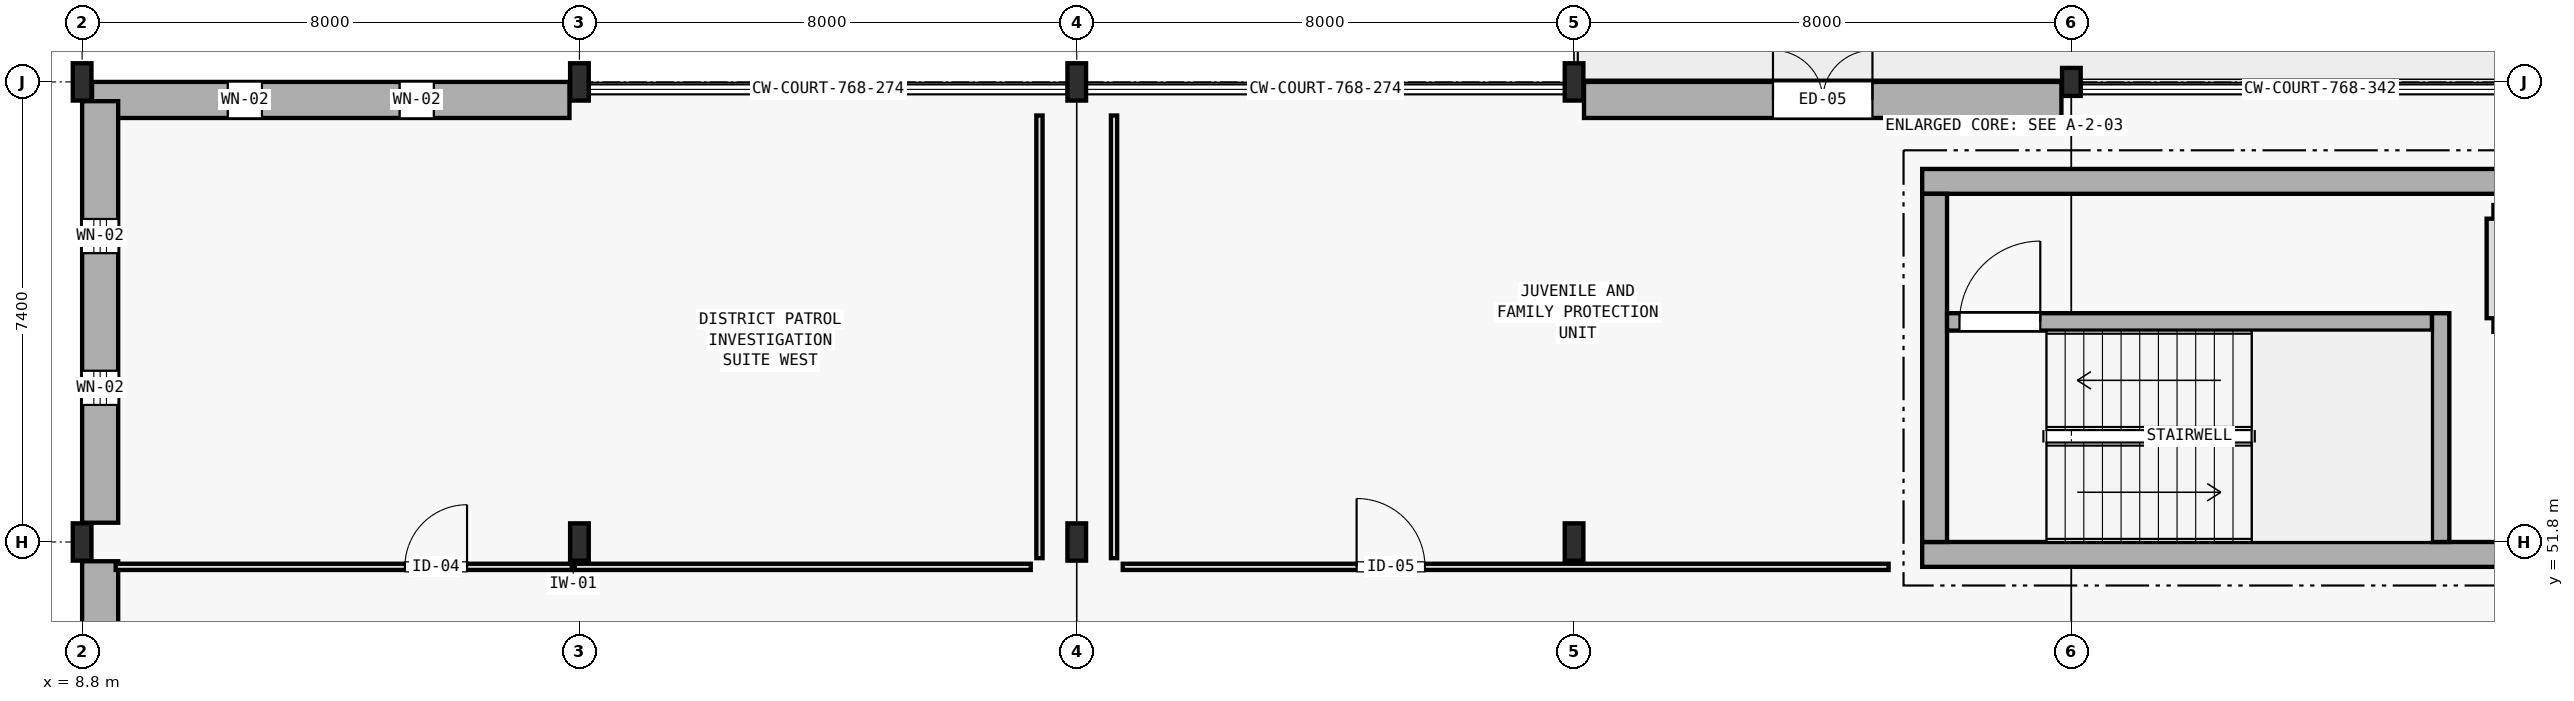
"""IFC4 building model, lengths in metres.
Left out: names, types, materials, properties, quantities, classifications, styles, units other than length and angle.
Written with IfcOpenShell. Run it as: python <this file> out.ifc"""

import sys

from ifc_helpers import new_model, si_unit, direction, frame, frame_2d, origin, origin_2d, place, context, subcontext, project, spatial, rectangle, i_section, extrude, element, fill, save


model = new_model("IFC4")
c1 = context("Model", 3, precision=1e-05, world=origin(), true_north=direction((0.0, 1.0)))
c2 = subcontext(c1, "Body", "Model", "MODEL_VIEW")
j1 = project(units=[si_unit("LENGTHUNIT", "METRE"), si_unit("PLANEANGLEUNIT", "RADIAN")], contexts=[c1])
p1 = place(None, origin())
s1 = spatial("IfcSite", under=j1, at=p1, CompositionType="ELEMENT")
p2 = place(p1, origin())
s2 = spatial("IfcBuilding", under=s1, at=p2, CompositionType="ELEMENT")
p3 = place(p2, frame((0.0, 0.0, 9.9)))
s3 = spatial("IfcBuildingStorey", under=s2, at=p3, CompositionType="ELEMENT", Elevation=9.9)
p4 = place(p3, frame((38.4, 51.6, 0.0), z_axis=(0.0, 0.0, 1.0), x_axis=(1.0, 0.0, 0.0)))
e1 = element("IfcWall", 1, at=p4, inside=s3, PredefinedType="SHEAR", context=c2, shape_type="SweptSolid", body=[
    extrude(rectangle(XDim=15.2, YDim=0.4, at=frame_2d((7.6, 0.0))), origin(), (0.0, 0.0, 1.0), 4.195),
])
p5 = place(p4, frame((10.25, 0.0, 0.0)))
e2 = element("IfcOpeningElement", 2, at=p5, cuts=e1, PredefinedType="OPENING", context=c2, shape_type="SweptSolid", body=[
    extrude(rectangle(XDim=1.3, YDim=2.2, at=frame_2d((0.65, 1.1))), frame((0.0, 0.21, 0.0), z_axis=(0.0, -1.0, 0.0), x_axis=(1.0, 0.0, 0.0)), (0.0, 0.0, 1.0), 0.42),
])
p6 = place(p3, frame((38.4, 57.6, 0.0), z_axis=(0.0, 0.0, 1.0), x_axis=(1.0, 0.0, 0.0)))
e3 = element("IfcWall", 3, at=p6, inside=s3, PredefinedType="SHEAR", context=c2, shape_type="SweptSolid", body=[
    extrude(rectangle(XDim=15.2, YDim=0.4, at=frame_2d((7.6, 0.0))), origin(), (0.0, 0.0, 1.0), 4.195),
])
p7 = place(p3, frame((38.6, 51.8, 0.0), z_axis=(0.0, 0.0, 1.0), x_axis=(0.0, 1.0, 0.0)))
e4 = element("IfcWall", 4, at=p7, inside=s3, PredefinedType="SHEAR", context=c2, shape_type="SweptSolid", body=[
    extrude(rectangle(XDim=5.6, YDim=0.4, at=frame_2d((2.8, 0.0))), origin(), (0.0, 0.0, 1.0), 4.195),
])
p8 = place(p3, frame((46.74, 51.8, 0.0), z_axis=(0.0, 0.0, 1.0), x_axis=(0.0, 1.0, 0.0)))
e5 = element("IfcWall", 5, at=p8, inside=s3, PredefinedType="SHEAR", context=c2, shape_type="SweptSolid", body=[
    extrude(rectangle(XDim=3.68, YDim=0.28, at=frame_2d((1.84, 0.0))), origin(), (0.0, 0.0, 1.0), 4.195),
])
p9 = place(p3, frame((38.8, 55.34, 0.0), z_axis=(0.0, 0.0, 1.0), x_axis=(1.0, 0.0, 0.0)))
e6 = element("IfcWall", 6, at=p9, inside=s3, PredefinedType="SHEAR", context=c2, shape_type="SweptSolid", body=[
    extrude(rectangle(XDim=7.8, YDim=0.28, at=frame_2d((3.9, 0.0))), origin(), (0.0, 0.0, 1.0), 4.195),
])
p10 = place(p9, frame((0.2, 0.0, 0.0)))
e7 = element("IfcOpeningElement", 7, at=p10, cuts=e6, PredefinedType="OPENING", context=c2, shape_type="SweptSolid", body=[
    extrude(rectangle(XDim=1.3, YDim=2.2, at=frame_2d((0.65, 1.1))), frame((0.0, 0.15, 0.0), z_axis=(0.0, -1.0, 0.0), x_axis=(1.0, 0.0, 0.0)), (0.0, 0.0, 1.0), 0.3),
])
for number, where, z_axis, x_axis in (
    (8, (8.8, 51.8, 0.0), (0.0, 0.0, 1.0), (1.0, 0.0, 0.0)),
    (9, (8.8, 59.2, 0.0), (0.0, 0.0, 1.0), (1.0, 0.0, 0.0)),
    (10, (16.8, 51.8, 0.0), (0.0, 0.0, 1.0), (1.0, 0.0, 0.0)),
    (11, (16.8, 59.2, 0.0), (0.0, 0.0, 1.0), (1.0, 0.0, 0.0)),
    (12, (24.8, 51.8, 0.0), (0.0, 0.0, 1.0), (1.0, 0.0, 0.0)),
    (13, (24.8, 59.2, 0.0), (0.0, 0.0, 1.0), (1.0, 0.0, 0.0)),
    (14, (32.8, 51.8, 0.0), (0.0, 0.0, 1.0), (1.0, 0.0, 0.0)),
    (15, (32.8, 59.2, 0.0), (0.0, 0.0, 1.0), (1.0, 0.0, 0.0)),
):
    element("IfcColumn", number, at=place(p3, frame(where, z_axis=z_axis, x_axis=x_axis)), inside=s3, PredefinedType="COLUMN", context=c2, shape_type="SweptSolid", body=[
        extrude(i_section(OverallWidth=0.3, OverallDepth=0.6, WebThickness=0.015, FlangeThickness=0.03, FilletRadius=0.027, at=origin_2d()), origin(), (0.0, 0.0, 1.0), 4.2),
    ])
p11 = place(p3, frame((40.8, 59.2, 0.0), z_axis=(0.0, 0.0, 1.0), x_axis=(1.0, 0.0, 0.0)))
e16 = element("IfcColumn", 16, at=p11, inside=s3, PredefinedType="COLUMN", context=c2, shape_type="SweptSolid", body=[
    extrude(i_section(OverallWidth=0.3, OverallDepth=0.45, WebThickness=0.014, FlangeThickness=0.026, FilletRadius=0.027, at=origin_2d()), origin(), (0.0, 0.0, 1.0), 4.2),
])
p12 = place(p3, frame((8.96, 58.91, 0.0), z_axis=(0.0, 0.0, 1.0), x_axis=(1.0, 0.0, 0.0)))
e17 = element("IfcWall", 17, at=p12, inside=s3, PredefinedType="STANDARD", context=c2, shape_type="SweptSolid", body=[
    extrude(rectangle(XDim=7.68, YDim=0.58, at=frame_2d((3.84, 0.0))), origin(), (0.0, 0.0, 1.0), 3.955),
])
p13 = place(p12, frame((2.183, 0.0, 0.9)))
e18 = element("IfcOpeningElement", 18, at=p13, cuts=e17, PredefinedType="OPENING", context=c2, shape_type="SweptSolid", body=[
    extrude(rectangle(XDim=0.55, YDim=1.75, at=frame_2d((0.275, 0.875))), frame((0.0, 0.3, 0.0), z_axis=(0.0, -1.0, 0.0), x_axis=(1.0, 0.0, 0.0)), (0.0, 0.0, 1.0), 0.6),
])
p14 = place(p12, frame((4.948, 0.0, 0.9)))
e19 = element("IfcOpeningElement", 19, at=p14, cuts=e17, PredefinedType="OPENING", context=c2, shape_type="SweptSolid", body=[
    extrude(rectangle(XDim=0.55, YDim=1.75, at=frame_2d((0.275, 0.875))), frame((0.0, 0.3, 0.0), z_axis=(0.0, -1.0, 0.0), x_axis=(1.0, 0.0, 0.0)), (0.0, 0.0, 1.0), 0.6),
])
p15 = place(p3, frame((32.96, 58.91, 0.0), z_axis=(0.0, 0.0, 1.0), x_axis=(1.0, 0.0, 0.0)))
e20 = element("IfcWall", 20, at=p15, inside=s3, PredefinedType="STANDARD", context=c2, shape_type="SweptSolid", body=[
    extrude(rectangle(XDim=7.68, YDim=0.58, at=frame_2d((3.84, 0.0))), origin(), (0.0, 0.0, 1.0), 3.955),
])
p16 = place(p15, frame((3.04, 0.0, 0.0)))
e21 = element("IfcOpeningElement", 21, at=p16, cuts=e20, PredefinedType="OPENING", context=c2, shape_type="SweptSolid", body=[
    extrude(rectangle(XDim=1.6, YDim=2.3, at=frame_2d((0.8, 1.15))), frame((0.0, 0.3, 0.0), z_axis=(0.0, -1.0, 0.0), x_axis=(1.0, 0.0, 0.0)), (0.0, 0.0, 1.0), 0.6),
])
p17 = place(p3, frame((9.09, 44.71, 0.0), z_axis=(0.0, 0.0, 1.0), x_axis=(0.0, 1.0, 0.0)))
e22 = element("IfcWall", 22, at=p17, inside=s3, PredefinedType="STANDARD", context=c2, shape_type="SweptSolid", body=[
    extrude(rectangle(XDim=6.78, YDim=0.58, at=frame_2d((3.39, 0.0))), origin(), (0.0, 0.0, 1.0), 3.955),
])
p18 = place(p17, frame((2.365, 0.0, 0.9)))
e23 = element("IfcOpeningElement", 23, at=p18, cuts=e22, PredefinedType="OPENING", context=c2, shape_type="SweptSolid", body=[
    extrude(rectangle(XDim=2.05, YDim=1.75, at=frame_2d((1.025, 0.875))), frame((0.0, 0.3, 0.0), z_axis=(0.0, -1.0, 0.0), x_axis=(1.0, 0.0, 0.0)), (0.0, 0.0, 1.0), 0.6),
])
p19 = place(p3, frame((9.09, 52.11, 0.0), z_axis=(0.0, 0.0, 1.0), x_axis=(0.0, 1.0, 0.0)))
e24 = element("IfcWall", 24, at=p19, inside=s3, PredefinedType="STANDARD", context=c2, shape_type="SweptSolid", body=[
    extrude(rectangle(XDim=6.78, YDim=0.58, at=frame_2d((3.39, 0.0))), origin(), (0.0, 0.0, 1.0), 3.955),
])
p20 = place(p19, frame((1.895, 0.0, 0.9)))
e25 = element("IfcOpeningElement", 25, at=p20, cuts=e24, PredefinedType="OPENING", context=c2, shape_type="SweptSolid", body=[
    extrude(rectangle(XDim=0.55, YDim=1.75, at=frame_2d((0.275, 0.875))), frame((0.0, 0.3, 0.0), z_axis=(0.0, -1.0, 0.0), x_axis=(1.0, 0.0, 0.0)), (0.0, 0.0, 1.0), 0.6),
])
p21 = place(p19, frame((4.335, 0.0, 0.9)))
e26 = element("IfcOpeningElement", 26, at=p21, cuts=e24, PredefinedType="OPENING", context=c2, shape_type="SweptSolid", body=[
    extrude(rectangle(XDim=0.55, YDim=1.75, at=frame_2d((0.275, 0.875))), frame((0.0, 0.3, 0.0), z_axis=(0.0, -1.0, 0.0), x_axis=(1.0, 0.0, 0.0)), (0.0, 0.0, 1.0), 0.6),
])
p22 = place(p3, frame((47.59, 55.29, 0.0), z_axis=(0.0, 0.0, 1.0), x_axis=(1.0, 0.0, 0.0)))
e27 = element("IfcWall", 27, at=p22, inside=s3, PredefinedType="PLUMBINGWALL", context=c2, shape_type="SweptSolid", body=[
    extrude(rectangle(XDim=1.62, YDim=0.22, at=frame_2d((0.81, 0.0))), origin(), (0.0, 0.0, 1.0), 3.92),
])
p23 = place(p22, frame((0.31, 0.0, 0.0)))
e28 = element("IfcOpeningElement", 28, at=p23, cuts=e27, PredefinedType="OPENING", context=c2, shape_type="SweptSolid", body=[
    extrude(rectangle(XDim=1.0, YDim=2.2, at=frame_2d((0.5, 1.1))), frame((0.0, 0.12, 0.0), z_axis=(0.0, -1.0, 0.0), x_axis=(1.0, 0.0, 0.0)), (0.0, 0.0, 1.0), 0.24),
])
p24 = place(p3, frame((47.59, 57.11, 0.0), z_axis=(0.0, 0.0, 1.0), x_axis=(1.0, 0.0, 0.0)))
e29 = element("IfcWall", 29, at=p24, inside=s3, PredefinedType="PLUMBINGWALL", context=c2, shape_type="SweptSolid", body=[
    extrude(rectangle(XDim=1.62, YDim=0.22, at=frame_2d((0.81, 0.0))), origin(), (0.0, 0.0, 1.0), 3.92),
])
p25 = place(p3, frame((47.59, 55.4, 0.0), z_axis=(0.0, 0.0, 1.0), x_axis=(0.0, 1.0, 0.0)))
e30 = element("IfcWall", 30, at=p25, inside=s3, PredefinedType="PLUMBINGWALL", context=c2, shape_type="SweptSolid", body=[
    extrude(rectangle(XDim=1.6, YDim=0.22, at=frame_2d((0.8, 0.0))), origin(), (0.0, 0.0, 1.0), 3.92),
])
p26 = place(p3, frame((9.34, 51.4, 0.0), z_axis=(0.0, 0.0, 1.0), x_axis=(1.0, 0.0, 0.0)))
e31 = element("IfcWall", 31, at=p26, inside=s3, PredefinedType="PARTITIONING", context=c2, shape_type="SweptSolid", body=[
    extrude(rectangle(XDim=14.72, YDim=0.1, at=frame_2d((7.36, 0.0))), origin(), (0.0, 0.0, 1.0), 3.445),
])
p27 = place(p26, frame((4.652, 0.0, 0.0)))
e32 = element("IfcOpeningElement", 32, at=p27, cuts=e31, PredefinedType="OPENING", context=c2, shape_type="SweptSolid", body=[
    extrude(rectangle(XDim=1.0, YDim=2.2, at=frame_2d((0.5, 1.1))), frame((0.0, 0.06, 0.0), z_axis=(0.0, -1.0, 0.0), x_axis=(1.0, 0.0, 0.0)), (0.0, 0.0, 1.0), 0.12),
])
p28 = place(p3, frame((24.2, 51.54, 0.0), z_axis=(0.0, 0.0, 1.0), x_axis=(0.0, 1.0, 0.0)))
e33 = element("IfcWall", 33, at=p28, inside=s3, PredefinedType="PARTITIONING", context=c2, shape_type="SweptSolid", body=[
    extrude(rectangle(XDim=7.12, YDim=0.1, at=frame_2d((3.56, 0.0))), origin(), (0.0, 0.0, 1.0), 2.735),
])
p29 = place(p3, frame((25.54, 51.4, 0.0), z_axis=(0.0, 0.0, 1.0), x_axis=(1.0, 0.0, 0.0)))
e34 = element("IfcWall", 34, at=p29, inside=s3, PredefinedType="PARTITIONING", context=c2, shape_type="SweptSolid", body=[
    extrude(rectangle(XDim=12.32, YDim=0.1, at=frame_2d((6.16, 0.0))), origin(), (0.0, 0.0, 1.0), 3.445),
])
p30 = place(p29, frame((3.762, 0.0, 0.0)))
e35 = element("IfcOpeningElement", 35, at=p30, cuts=e34, PredefinedType="OPENING", context=c2, shape_type="SweptSolid", body=[
    extrude(rectangle(XDim=1.1, YDim=2.2, at=frame_2d((0.55, 1.1))), frame((0.0, 0.06, 0.0), z_axis=(0.0, -1.0, 0.0), x_axis=(1.0, 0.0, 0.0)), (0.0, 0.0, 1.0), 0.12),
])
p31 = place(p3, frame((25.4, 51.54, 0.0), z_axis=(0.0, 0.0, 1.0), x_axis=(0.0, 1.0, 0.0)))
e36 = element("IfcWall", 36, at=p31, inside=s3, PredefinedType="PARTITIONING", context=c2, shape_type="SweptSolid", body=[
    extrude(rectangle(XDim=7.12, YDim=0.1, at=frame_2d((3.56, 0.0))), origin(), (0.0, 0.0, 1.0), 2.735),
])
p32 = place(p13, origin())
e37 = element("IfcWindow", 37, at=p32, inside=s3, PartitioningType="SINGLE_PANEL", PredefinedType="WINDOW", context=c2, shape_type="SweptSolid", body=[
    extrude(rectangle(XDim=0.55, YDim=1.75, at=frame_2d((0.275, 0.875))), frame((0.0, 0.03, 0.0), z_axis=(0.0, -1.0, 0.0), x_axis=(1.0, 0.0, 0.0)), (0.0, 0.0, 1.0), 0.06),
])
fill(e18, e37)
p33 = place(p14, origin())
e38 = element("IfcWindow", 38, at=p33, inside=s3, PartitioningType="SINGLE_PANEL", PredefinedType="WINDOW", context=c2, shape_type="SweptSolid", body=[
    extrude(rectangle(XDim=0.55, YDim=1.75, at=frame_2d((0.275, 0.875))), frame((0.0, 0.03, 0.0), z_axis=(0.0, -1.0, 0.0), x_axis=(1.0, 0.0, 0.0)), (0.0, 0.0, 1.0), 0.06),
])
fill(e19, e38)
p34 = place(p16, origin())
e39 = element("IfcDoor", 39, at=p34, inside=s3, OperationType="DOUBLE_DOOR_SINGLE_SWING", PredefinedType="DOOR", context=c2, shape_type="SweptSolid", body=[
    extrude(rectangle(XDim=1.6, YDim=2.3, at=frame_2d((0.8, 1.15))), frame((0.0, 0.025, 0.0), z_axis=(0.0, -1.0, 0.0), x_axis=(1.0, 0.0, 0.0)), (0.0, 0.0, 1.0), 0.05),
])
fill(e21, e39)
p35 = place(p20, origin())
e40 = element("IfcWindow", 40, at=p35, inside=s3, PartitioningType="SINGLE_PANEL", PredefinedType="WINDOW", context=c2, shape_type="SweptSolid", body=[
    extrude(rectangle(XDim=0.55, YDim=1.75, at=frame_2d((0.275, 0.875))), frame((0.0, 0.03, 0.0), z_axis=(0.0, -1.0, 0.0), x_axis=(1.0, 0.0, 0.0)), (0.0, 0.0, 1.0), 0.06),
])
fill(e25, e40)
p36 = place(p21, origin())
e41 = element("IfcWindow", 41, at=p36, inside=s3, PartitioningType="SINGLE_PANEL", PredefinedType="WINDOW", context=c2, shape_type="SweptSolid", body=[
    extrude(rectangle(XDim=0.55, YDim=1.75, at=frame_2d((0.275, 0.875))), frame((0.0, 0.03, 0.0), z_axis=(0.0, -1.0, 0.0), x_axis=(1.0, 0.0, 0.0)), (0.0, 0.0, 1.0), 0.06),
])
fill(e26, e41)
p37 = place(p10, origin())
e42 = element("IfcDoor", 42, at=p37, inside=s3, OperationType="SINGLE_SWING_RIGHT", PredefinedType="DOOR", context=c2, shape_type="SweptSolid", body=[
    extrude(rectangle(XDim=1.3, YDim=2.2, at=frame_2d((0.65, 1.1))), frame((0.0, 0.025, 0.0), z_axis=(0.0, -1.0, 0.0), x_axis=(1.0, 0.0, 0.0)), (0.0, 0.0, 1.0), 0.05),
])
fill(e7, e42)
p38 = place(p27, origin())
e43 = element("IfcDoor", 43, at=p38, inside=s3, OperationType="SINGLE_SWING_RIGHT", PredefinedType="DOOR", context=c2, shape_type="SweptSolid", body=[
    extrude(rectangle(XDim=1.0, YDim=2.2, at=frame_2d((0.5, 1.1))), frame((0.0, 0.025, 0.0), z_axis=(0.0, -1.0, 0.0), x_axis=(1.0, 0.0, 0.0)), (0.0, 0.0, 1.0), 0.05),
])
fill(e32, e43)
p39 = place(p30, origin())
e44 = element("IfcDoor", 44, at=p39, inside=s3, OperationType="SINGLE_SWING_LEFT", PredefinedType="DOOR", context=c2, shape_type="SweptSolid", body=[
    extrude(rectangle(XDim=1.1, YDim=2.2, at=frame_2d((0.55, 1.1))), frame((0.0, 0.025, 0.0), z_axis=(0.0, -1.0, 0.0), x_axis=(1.0, 0.0, 0.0)), (0.0, 0.0, 1.0), 0.05),
])
fill(e35, e44)
save(model, sys.argv[1])
